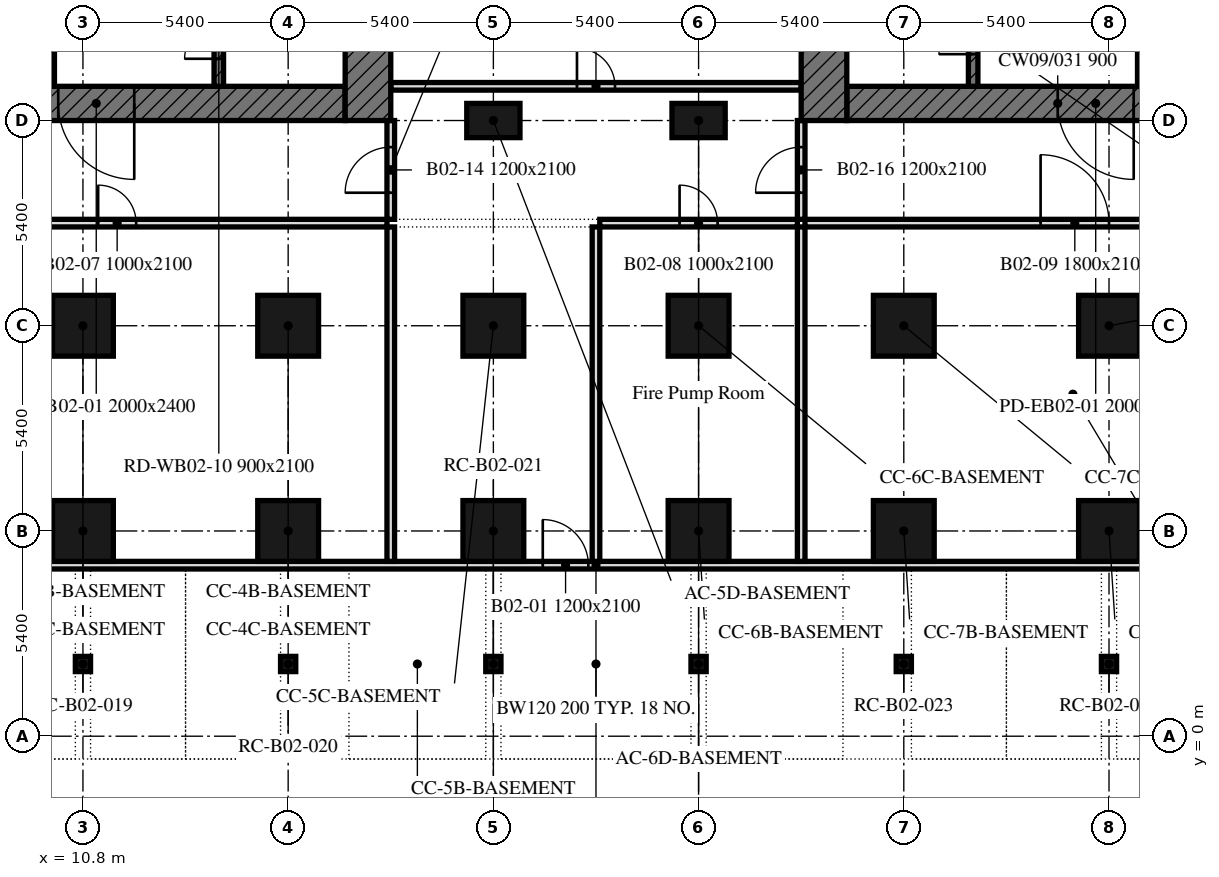
"""IFC4 building model, lengths in metres.
Left out: names, types, materials, properties, quantities, classifications, styles, units other than length and angle.
Written with IfcOpenShell. Run it as: python <this file> out.ifc"""

import sys

from ifc_helpers import new_model, si_unit, direction, frame, frame_2d, origin, origin_2d, place, context, subcontext, project, spatial, rectangle, extrude, element, fill, save


model = new_model("IFC4")
c1 = context("Model", 3, precision=1e-05, world=origin(), true_north=direction((0.0, 1.0)))
c2 = subcontext(c1, "Body", "Model", "MODEL_VIEW")
j1 = project(units=[si_unit("LENGTHUNIT", "METRE"), si_unit("PLANEANGLEUNIT", "RADIAN")], contexts=[c1])
p1 = place(None, origin())
s1 = spatial("IfcSite", under=j1, at=p1, CompositionType="ELEMENT")
p2 = place(p1, origin())
s2 = spatial("IfcBuilding", under=s1, at=p2, CompositionType="ELEMENT")
p3 = place(p2, frame((0.0, 0.0, -9.0)))
s3 = spatial("IfcBuildingStorey", under=s2, at=p3, CompositionType="ELEMENT", Elevation=-9.0)
for number, where, z_axis, x_axis in (
    (1, (10.8, 5.4, 0.0), (0.0, 0.0, 1.0), (1.0, 0.0, 0.0)),
    (2, (16.2, 5.4, 0.0), (0.0, 0.0, 1.0), (1.0, 0.0, 0.0)),
    (3, (21.6, 5.4, 0.0), (0.0, 0.0, 1.0), (1.0, 0.0, 0.0)),
    (4, (27.0, 5.4, 0.0), (0.0, 0.0, 1.0), (1.0, 0.0, 0.0)),
    (5, (32.4, 5.4, 0.0), (0.0, 0.0, 1.0), (1.0, 0.0, 0.0)),
    (6, (37.8, 5.4, 0.0), (0.0, 0.0, 1.0), (1.0, 0.0, 0.0)),
    (7, (10.8, 10.8, 0.0), (0.0, 0.0, 1.0), (1.0, 0.0, 0.0)),
    (8, (16.2, 10.8, 0.0), (0.0, 0.0, 1.0), (1.0, 0.0, 0.0)),
    (9, (21.6, 10.8, 0.0), (0.0, 0.0, 1.0), (1.0, 0.0, 0.0)),
    (10, (27.0, 10.8, 0.0), (0.0, 0.0, 1.0), (1.0, 0.0, 0.0)),
    (11, (32.4, 10.8, 0.0), (0.0, 0.0, 1.0), (1.0, 0.0, 0.0)),
    (12, (37.8, 10.8, 0.0), (0.0, 0.0, 1.0), (1.0, 0.0, 0.0)),
):
    element("IfcColumn", number, at=place(p3, frame(where, z_axis=z_axis, x_axis=x_axis)), inside=s3, PredefinedType="COLUMN", context=c2, shape_type="SweptSolid", body=[
        extrude(rectangle(XDim=1.6, YDim=1.6, at=origin_2d()), origin(), (0.0, 0.0, 1.0), 4.1),
    ])
for number, where, z_axis, x_axis in (
    (13, (21.6, 16.2, 0.0), (0.0, 0.0, 1.0), (1.0, 0.0, 0.0)),
    (14, (27.0, 16.2, 0.0), (0.0, 0.0, 1.0), (1.0, 0.0, 0.0)),
):
    element("IfcColumn", number, at=place(p3, frame(where, z_axis=z_axis, x_axis=x_axis)), inside=s3, PredefinedType="COLUMN", context=c2, shape_type="SweptSolid", body=[
        extrude(rectangle(XDim=1.4, YDim=0.9, at=origin_2d()), origin(), (0.0, 0.0, 1.0), 4.1),
    ])
for number, where, z_axis, x_axis in (
    (15, (10.8, 1.9, 0.0), (0.0, 0.0, 1.0), (1.0, 0.0, 0.0)),
    (16, (16.2, 1.9, 0.0), (0.0, 0.0, 1.0), (1.0, 0.0, 0.0)),
    (17, (21.6, 1.9, 0.0), (0.0, 0.0, 1.0), (1.0, 0.0, 0.0)),
    (18, (27.0, 1.9, 0.0), (0.0, 0.0, 1.0), (1.0, 0.0, 0.0)),
    (19, (32.4, 1.9, 0.0), (0.0, 0.0, 1.0), (1.0, 0.0, 0.0)),
    (20, (37.8, 1.9, 0.0), (0.0, 0.0, 1.0), (1.0, 0.0, 0.0)),
):
    element("IfcColumn", number, at=place(p3, frame(where, z_axis=z_axis, x_axis=x_axis)), inside=s3, PredefinedType="COLUMN", context=c2, shape_type="SweptSolid", body=[
        extrude(rectangle(XDim=0.4, YDim=0.4, at=origin_2d()), origin(), (0.0, 0.0, 1.0), 4.1),
    ])
p4 = place(p3, frame((4.6, 4.5, 0.0), z_axis=(0.0, 0.0, 1.0), x_axis=(1.0, 0.0, 0.0)))
e21 = element("IfcWall", 21, at=p4, inside=s3, PredefinedType="PARTITIONING", context=c2, shape_type="SweptSolid", body=[
    extrude(rectangle(XDim=39.4, YDim=0.2, at=frame_2d((19.7, 0.0))), origin(), (0.0, 0.0, 1.0), 4.1),
])
p5 = place(p4, frame((18.3, 0.0, 0.0)))
e22 = element("IfcOpeningElement", 22, at=p5, cuts=e21, PredefinedType="OPENING", context=c2, shape_type="SweptSolid", body=[
    extrude(rectangle(XDim=1.2, YDim=2.1, at=frame_2d((0.6, 1.05))), frame((0.0, 0.11, 0.0), z_axis=(0.0, -1.0, 0.0), x_axis=(1.0, 0.0, 0.0)), (0.0, 0.0, 1.0), 0.22),
])
for number, where, z_axis, x_axis in (
    (23, (18.9, 4.6, 0.0), (0.0, 0.0, 1.0), (0.0, 1.0, 0.0)),
    (24, (24.3, 4.6, 0.0), (0.0, 0.0, 1.0), (0.0, 1.0, 0.0)),
    (25, (29.7, 4.6, 0.0), (0.0, 0.0, 1.0), (0.0, 1.0, 0.0)),
):
    element("IfcWall", number, at=place(p3, frame(where, z_axis=z_axis, x_axis=x_axis)), inside=s3, PredefinedType="PARTITIONING", context=c2, shape_type="SweptSolid", body=[
        extrude(rectangle(XDim=8.8, YDim=0.2, at=frame_2d((4.4, 0.0))), origin(), (0.0, 0.0, 1.0), 4.1),
    ])
p6 = place(p3, frame((4.6, 13.5, 0.0), z_axis=(0.0, 0.0, 1.0), x_axis=(1.0, 0.0, 0.0)))
e26 = element("IfcWall", 26, at=p6, inside=s3, PredefinedType="PARTITIONING", context=c2, shape_type="SweptSolid", body=[
    extrude(rectangle(XDim=14.2, YDim=0.2, at=frame_2d((7.1, 0.0))), origin(), (0.0, 0.0, 1.0), 4.1),
])
p7 = place(p6, frame((6.6, 0.0, 0.0)))
e27 = element("IfcOpeningElement", 27, at=p7, cuts=e26, PredefinedType="OPENING", context=c2, shape_type="SweptSolid", body=[
    extrude(rectangle(XDim=1.0, YDim=2.1, at=frame_2d((0.5, 1.05))), frame((0.0, 0.11, 0.0), z_axis=(0.0, -1.0, 0.0), x_axis=(1.0, 0.0, 0.0)), (0.0, 0.0, 1.0), 0.22),
])
p8 = place(p3, frame((24.4, 13.5, 0.0), z_axis=(0.0, 0.0, 1.0), x_axis=(1.0, 0.0, 0.0)))
e28 = element("IfcWall", 28, at=p8, inside=s3, PredefinedType="PARTITIONING", context=c2, shape_type="SweptSolid", body=[
    extrude(rectangle(XDim=5.2, YDim=0.2, at=frame_2d((2.6, 0.0))), origin(), (0.0, 0.0, 1.0), 4.1),
])
p9 = place(p8, frame((2.1, 0.0, 0.0)))
e29 = element("IfcOpeningElement", 29, at=p9, cuts=e28, PredefinedType="OPENING", context=c2, shape_type="SweptSolid", body=[
    extrude(rectangle(XDim=1.0, YDim=2.1, at=frame_2d((0.5, 1.05))), frame((0.0, 0.11, 0.0), z_axis=(0.0, -1.0, 0.0), x_axis=(1.0, 0.0, 0.0)), (0.0, 0.0, 1.0), 0.22),
])
p10 = place(p3, frame((29.8, 13.5, 0.0), z_axis=(0.0, 0.0, 1.0), x_axis=(1.0, 0.0, 0.0)))
e30 = element("IfcWall", 30, at=p10, inside=s3, PredefinedType="PARTITIONING", context=c2, shape_type="SweptSolid", body=[
    extrude(rectangle(XDim=14.2, YDim=0.2, at=frame_2d((7.1, 0.0))), origin(), (0.0, 0.0, 1.0), 4.1),
])
p11 = place(p10, frame((6.2, 0.0, 0.0)))
e31 = element("IfcOpeningElement", 31, at=p11, cuts=e30, PredefinedType="OPENING", context=c2, shape_type="SweptSolid", body=[
    extrude(rectangle(XDim=1.8, YDim=2.1, at=frame_2d((0.9, 1.05))), frame((0.0, 0.11, 0.0), z_axis=(0.0, -1.0, 0.0), x_axis=(1.0, 0.0, 0.0)), (0.0, 0.0, 1.0), 0.22),
])
p12 = place(p3, frame((18.9, 13.6, 0.0), z_axis=(0.0, 0.0, 1.0), x_axis=(0.0, 1.0, 0.0)))
e32 = element("IfcWall", 32, at=p12, inside=s3, PredefinedType="PARTITIONING", context=c2, shape_type="SweptSolid", body=[
    extrude(rectangle(XDim=2.6, YDim=0.2, at=frame_2d((1.3, 0.0))), origin(), (0.0, 0.0, 1.0), 4.1),
])
p13 = place(p12, frame((0.7, 0.0, 0.0)))
e33 = element("IfcOpeningElement", 33, at=p13, cuts=e32, PredefinedType="OPENING", context=c2, shape_type="SweptSolid", body=[
    extrude(rectangle(XDim=1.2, YDim=2.1, at=frame_2d((0.6, 1.05))), frame((0.0, 0.11, 0.0), z_axis=(0.0, -1.0, 0.0), x_axis=(1.0, 0.0, 0.0)), (0.0, 0.0, 1.0), 0.22),
])
p14 = place(p3, frame((29.7, 13.6, 0.0), z_axis=(0.0, 0.0, 1.0), x_axis=(0.0, 1.0, 0.0)))
e34 = element("IfcWall", 34, at=p14, inside=s3, PredefinedType="PARTITIONING", context=c2, shape_type="SweptSolid", body=[
    extrude(rectangle(XDim=2.6, YDim=0.2, at=frame_2d((1.3, 0.0))), origin(), (0.0, 0.0, 1.0), 4.1),
])
p15 = place(p14, frame((0.7, 0.0, 0.0)))
e35 = element("IfcOpeningElement", 35, at=p15, cuts=e34, PredefinedType="OPENING", context=c2, shape_type="SweptSolid", body=[
    extrude(rectangle(XDim=1.2, YDim=2.1, at=frame_2d((0.6, 1.05))), frame((0.0, 0.11, 0.0), z_axis=(0.0, -1.0, 0.0), x_axis=(1.0, 0.0, 0.0)), (0.0, 0.0, 1.0), 0.22),
])
p16 = place(p3, frame((18.9, 17.1, 0.0), z_axis=(0.0, 0.0, 1.0), x_axis=(1.0, 0.0, 0.0)))
e36 = element("IfcWall", 36, at=p16, inside=s3, PredefinedType="PARTITIONING", context=c2, shape_type="SweptSolid", body=[
    extrude(rectangle(XDim=10.8, YDim=0.2, at=frame_2d((5.4, 0.0))), origin(), (0.0, 0.0, 1.0), 4.1),
])
p17 = place(p16, frame((4.9, 0.0, 0.0)))
e37 = element("IfcOpeningElement", 37, at=p17, cuts=e36, PredefinedType="OPENING", context=c2, shape_type="SweptSolid", body=[
    extrude(rectangle(XDim=1.0, YDim=2.1, at=frame_2d((0.5, 1.05))), frame((0.0, 0.11, 0.0), z_axis=(0.0, -1.0, 0.0), x_axis=(1.0, 0.0, 0.0)), (0.0, 0.0, 1.0), 0.22),
])
p18 = place(p3, frame((17.7, 16.65, 0.0), z_axis=(0.0, 0.0, 1.0), x_axis=(-1.0, 0.0, 0.0)))
e38 = element("IfcWall", 38, at=p18, inside=s3, PredefinedType="SOLIDWALL", context=c2, shape_type="SweptSolid", body=[
    extrude(rectangle(XDim=11.1, YDim=0.9, at=frame_2d((5.55, 0.0))), origin(), (0.0, 0.0, 1.0), 4.1),
])
p19 = place(p18, frame((5.55, 0.0, 0.0)))
e39 = element("IfcOpeningElement", 39, at=p19, cuts=e38, PredefinedType="OPENING", context=c2, shape_type="SweptSolid", body=[
    extrude(rectangle(XDim=2.0, YDim=2.4, at=frame_2d((1.0, 1.2))), frame((0.0, 0.45, 0.0), z_axis=(0.0, -1.0, 0.0), x_axis=(1.0, 0.0, 0.0)), (0.0, 0.0, 1.0), 0.9),
])
p20 = place(p3, frame((18.3, 32.4, 0.0), z_axis=(0.0, 0.0, 1.0), x_axis=(0.0, -1.0, 0.0)))
e40 = element("IfcWall", 40, at=p20, inside=s3, PredefinedType="SOLIDWALL", context=c2, shape_type="SweptSolid", body=[
    extrude(rectangle(XDim=16.2, YDim=1.2, at=frame_2d((8.1, 0.0))), origin(), (0.0, 0.0, 1.0), 4.1),
])
p21 = place(p3, frame((9.925, 17.1, 0.0), z_axis=(0.0, 0.0, 1.0), x_axis=(0.0, 1.0, 0.0)))
e41 = element("IfcWall", 41, at=p21, inside=s3, PredefinedType="SOLIDWALL", context=c2, shape_type="SweptSolid", body=[
    extrude(rectangle(XDim=14.4, YDim=0.25, at=frame_2d((7.2, 0.0))), origin(), (0.0, 0.0, 1.0), 4.1),
])
p22 = place(p21, frame((4.6, 0.0, 0.0)))
e42 = element("IfcOpeningElement", 42, at=p22, cuts=e41, PredefinedType="OPENING", context=c2, shape_type="SweptSolid", body=[
    extrude(rectangle(XDim=1.0, YDim=2.1, at=frame_2d((0.5, 1.05))), frame((0.0, 0.125, 0.0), z_axis=(0.0, -1.0, 0.0), x_axis=(1.0, 0.0, 0.0)), (0.0, 0.0, 1.0), 0.25),
])
p23 = place(p21, frame((7.062, 0.0, 0.0)))
e43 = element("IfcOpeningElement", 43, at=p23, cuts=e41, PredefinedType="OPENING", context=c2, shape_type="SweptSolid", body=[
    extrude(rectangle(XDim=1.2, YDim=2.1, at=frame_2d((0.6, 1.05))), frame((0.0, 0.125, 0.0), z_axis=(0.0, -1.0, 0.0), x_axis=(1.0, 0.0, 0.0)), (0.0, 0.0, 1.0), 0.25),
])
p24 = place(p21, frame((9.925, 0.0, 0.0)))
e44 = element("IfcOpeningElement", 44, at=p24, cuts=e41, PredefinedType="OPENING", context=c2, shape_type="SweptSolid", body=[
    extrude(rectangle(XDim=1.1, YDim=2.1, at=frame_2d((0.55, 1.05))), frame((0.0, 0.125, 0.0), z_axis=(0.0, -1.0, 0.0), x_axis=(1.0, 0.0, 0.0)), (0.0, 0.0, 1.0), 0.25),
])
p25 = place(p21, frame((12.587, 0.0, 0.0)))
e45 = element("IfcOpeningElement", 45, at=p25, cuts=e41, PredefinedType="OPENING", context=c2, shape_type="SweptSolid", body=[
    extrude(rectangle(XDim=1.1, YDim=2.1, at=frame_2d((0.55, 1.05))), frame((0.0, 0.125, 0.0), z_axis=(0.0, -1.0, 0.0), x_axis=(1.0, 0.0, 0.0)), (0.0, 0.0, 1.0), 0.25),
])
p26 = place(p3, frame((14.375, 17.1, 0.0), z_axis=(0.0, 0.0, 1.0), x_axis=(0.0, 1.0, 0.0)))
e46 = element("IfcWall", 46, at=p26, inside=s3, PredefinedType="SOLIDWALL", context=c2, shape_type="SweptSolid", body=[
    extrude(rectangle(XDim=14.4, YDim=0.25, at=frame_2d((7.2, 0.0))), origin(), (0.0, 0.0, 1.0), 4.1),
])
p27 = place(p26, frame((13.15, 0.0, 0.0)))
e47 = element("IfcOpeningElement", 47, at=p27, cuts=e46, PredefinedType="OPENING", context=c2, shape_type="SweptSolid", body=[
    extrude(rectangle(XDim=1.0, YDim=2.1, at=frame_2d((0.5, 1.05))), frame((0.0, 0.125, 0.0), z_axis=(0.0, -1.0, 0.0), x_axis=(1.0, 0.0, 0.0)), (0.0, 0.0, 1.0), 0.25),
])
p28 = place(p26, frame((0.725, 0.0, 0.0)))
e48 = element("IfcOpeningElement", 48, at=p28, cuts=e46, PredefinedType="OPENING", context=c2, shape_type="SweptSolid", body=[
    extrude(rectangle(XDim=0.9, YDim=2.1, at=frame_2d((0.45, 1.05))), frame((0.0, 0.125, 0.0), z_axis=(0.0, -1.0, 0.0), x_axis=(1.0, 0.0, 0.0)), (0.0, 0.0, 1.0), 0.25),
])
p29 = place(p26, frame((3.225, 0.0, 0.0)))
e49 = element("IfcOpeningElement", 49, at=p29, cuts=e46, PredefinedType="OPENING", context=c2, shape_type="SweptSolid", body=[
    extrude(rectangle(XDim=0.9, YDim=2.1, at=frame_2d((0.45, 1.05))), frame((0.0, 0.125, 0.0), z_axis=(0.0, -1.0, 0.0), x_axis=(1.0, 0.0, 0.0)), (0.0, 0.0, 1.0), 0.25),
])
p30 = place(p26, frame((6.175, 0.0, 0.0)))
e50 = element("IfcOpeningElement", 50, at=p30, cuts=e46, PredefinedType="OPENING", context=c2, shape_type="SweptSolid", body=[
    extrude(rectangle(XDim=0.9, YDim=2.1, at=frame_2d((0.45, 1.05))), frame((0.0, 0.125, 0.0), z_axis=(0.0, -1.0, 0.0), x_axis=(1.0, 0.0, 0.0)), (0.0, 0.0, 1.0), 0.25),
])
p31 = place(p3, frame((42.0, 16.65, 0.0), z_axis=(0.0, 0.0, 1.0), x_axis=(-1.0, 0.0, 0.0)))
e51 = element("IfcWall", 51, at=p31, inside=s3, PredefinedType="SOLIDWALL", context=c2, shape_type="SweptSolid", body=[
    extrude(rectangle(XDim=11.1, YDim=0.9, at=frame_2d((5.55, 0.0))), origin(), (0.0, 0.0, 1.0), 4.1),
])
p32 = place(p31, frame((3.55, 0.0, 0.0)))
e52 = element("IfcOpeningElement", 52, at=p32, cuts=e51, PredefinedType="OPENING", context=c2, shape_type="SweptSolid", body=[
    extrude(rectangle(XDim=2.0, YDim=2.4, at=frame_2d((1.0, 1.2))), frame((0.0, 0.45, 0.0), z_axis=(0.0, -1.0, 0.0), x_axis=(1.0, 0.0, 0.0)), (0.0, 0.0, 1.0), 0.9),
])
p33 = place(p3, frame((30.3, 16.2, 0.0), z_axis=(0.0, 0.0, 1.0), x_axis=(0.0, 1.0, 0.0)))
e53 = element("IfcWall", 53, at=p33, inside=s3, PredefinedType="SOLIDWALL", context=c2, shape_type="SweptSolid", body=[
    extrude(rectangle(XDim=16.2, YDim=1.2, at=frame_2d((8.1, 0.0))), origin(), (0.0, 0.0, 1.0), 4.1),
])
p34 = place(p3, frame((38.675, 17.1, 0.0), z_axis=(0.0, 0.0, 1.0), x_axis=(0.0, 1.0, 0.0)))
e54 = element("IfcWall", 54, at=p34, inside=s3, PredefinedType="SOLIDWALL", context=c2, shape_type="SweptSolid", body=[
    extrude(rectangle(XDim=14.4, YDim=0.25, at=frame_2d((7.2, 0.0))), origin(), (0.0, 0.0, 1.0), 4.1),
])
p35 = place(p34, frame((4.6, 0.0, 0.0)))
e55 = element("IfcOpeningElement", 55, at=p35, cuts=e54, PredefinedType="OPENING", context=c2, shape_type="SweptSolid", body=[
    extrude(rectangle(XDim=1.0, YDim=2.1, at=frame_2d((0.5, 1.05))), frame((0.0, 0.125, 0.0), z_axis=(0.0, -1.0, 0.0), x_axis=(1.0, 0.0, 0.0)), (0.0, 0.0, 1.0), 0.25),
])
p36 = place(p34, frame((7.062, 0.0, 0.0)))
e56 = element("IfcOpeningElement", 56, at=p36, cuts=e54, PredefinedType="OPENING", context=c2, shape_type="SweptSolid", body=[
    extrude(rectangle(XDim=1.2, YDim=2.1, at=frame_2d((0.6, 1.05))), frame((0.0, 0.125, 0.0), z_axis=(0.0, -1.0, 0.0), x_axis=(1.0, 0.0, 0.0)), (0.0, 0.0, 1.0), 0.25),
])
p37 = place(p34, frame((9.925, 0.0, 0.0)))
e57 = element("IfcOpeningElement", 57, at=p37, cuts=e54, PredefinedType="OPENING", context=c2, shape_type="SweptSolid", body=[
    extrude(rectangle(XDim=1.1, YDim=2.1, at=frame_2d((0.55, 1.05))), frame((0.0, 0.125, 0.0), z_axis=(0.0, -1.0, 0.0), x_axis=(1.0, 0.0, 0.0)), (0.0, 0.0, 1.0), 0.25),
])
p38 = place(p34, frame((12.587, 0.0, 0.0)))
e58 = element("IfcOpeningElement", 58, at=p38, cuts=e54, PredefinedType="OPENING", context=c2, shape_type="SweptSolid", body=[
    extrude(rectangle(XDim=1.1, YDim=2.1, at=frame_2d((0.55, 1.05))), frame((0.0, 0.125, 0.0), z_axis=(0.0, -1.0, 0.0), x_axis=(1.0, 0.0, 0.0)), (0.0, 0.0, 1.0), 0.25),
])
p39 = place(p3, frame((34.225, 17.1, 0.0), z_axis=(0.0, 0.0, 1.0), x_axis=(0.0, 1.0, 0.0)))
e59 = element("IfcWall", 59, at=p39, inside=s3, PredefinedType="SOLIDWALL", context=c2, shape_type="SweptSolid", body=[
    extrude(rectangle(XDim=14.4, YDim=0.25, at=frame_2d((7.2, 0.0))), origin(), (0.0, 0.0, 1.0), 4.1),
])
p40 = place(p39, frame((13.15, 0.0, 0.0)))
e60 = element("IfcOpeningElement", 60, at=p40, cuts=e59, PredefinedType="OPENING", context=c2, shape_type="SweptSolid", body=[
    extrude(rectangle(XDim=1.0, YDim=2.1, at=frame_2d((0.5, 1.05))), frame((0.0, 0.125, 0.0), z_axis=(0.0, -1.0, 0.0), x_axis=(1.0, 0.0, 0.0)), (0.0, 0.0, 1.0), 0.25),
])
p41 = place(p39, frame((0.846, 0.0, 0.0)))
e61 = element("IfcOpeningElement", 61, at=p41, cuts=e59, PredefinedType="OPENING", context=c2, shape_type="SweptSolid", body=[
    extrude(rectangle(XDim=0.9, YDim=2.1, at=frame_2d((0.45, 1.05))), frame((0.0, 0.125, 0.0), z_axis=(0.0, -1.0, 0.0), x_axis=(1.0, 0.0, 0.0)), (0.0, 0.0, 1.0), 0.25),
])
p42 = place(p39, frame((3.346, 0.0, 0.0)))
e62 = element("IfcOpeningElement", 62, at=p42, cuts=e59, PredefinedType="OPENING", context=c2, shape_type="SweptSolid", body=[
    extrude(rectangle(XDim=0.9, YDim=2.1, at=frame_2d((0.45, 1.05))), frame((0.0, 0.125, 0.0), z_axis=(0.0, -1.0, 0.0), x_axis=(1.0, 0.0, 0.0)), (0.0, 0.0, 1.0), 0.25),
])
p43 = place(p39, frame((6.175, 0.0, 0.0)))
e63 = element("IfcOpeningElement", 63, at=p43, cuts=e59, PredefinedType="OPENING", context=c2, shape_type="SweptSolid", body=[
    extrude(rectangle(XDim=0.9, YDim=2.1, at=frame_2d((0.45, 1.05))), frame((0.0, 0.125, 0.0), z_axis=(0.0, -1.0, 0.0), x_axis=(1.0, 0.0, 0.0)), (0.0, 0.0, 1.0), 0.25),
])
p44 = place(p5, origin())
e64 = element("IfcDoor", 64, at=p44, inside=s3, OperationType="SINGLE_SWING_LEFT", PredefinedType="DOOR", context=c2, shape_type="SweptSolid", body=[
    extrude(rectangle(XDim=1.2, YDim=2.1, at=frame_2d((0.6, 1.05))), frame((0.0, 0.025, 0.0), z_axis=(0.0, -1.0, 0.0), x_axis=(1.0, 0.0, 0.0)), (0.0, 0.0, 1.0), 0.05),
])
fill(e22, e64)
p45 = place(p7, origin())
e65 = element("IfcDoor", 65, at=p45, inside=s3, OperationType="SINGLE_SWING_LEFT", PredefinedType="DOOR", context=c2, shape_type="SweptSolid", body=[
    extrude(rectangle(XDim=1.0, YDim=2.1, at=frame_2d((0.5, 1.05))), frame((0.0, 0.025, 0.0), z_axis=(0.0, -1.0, 0.0), x_axis=(1.0, 0.0, 0.0)), (0.0, 0.0, 1.0), 0.05),
])
fill(e27, e65)
p46 = place(p9, origin())
e66 = element("IfcDoor", 66, at=p46, inside=s3, OperationType="SINGLE_SWING_LEFT", PredefinedType="DOOR", context=c2, shape_type="SweptSolid", body=[
    extrude(rectangle(XDim=1.0, YDim=2.1, at=frame_2d((0.5, 1.05))), frame((0.0, 0.025, 0.0), z_axis=(0.0, -1.0, 0.0), x_axis=(1.0, 0.0, 0.0)), (0.0, 0.0, 1.0), 0.05),
])
fill(e29, e66)
p47 = place(p11, origin())
e67 = element("IfcDoor", 67, at=p47, inside=s3, OperationType="DOUBLE_DOOR_SINGLE_SWING", PredefinedType="DOOR", context=c2, shape_type="SweptSolid", body=[
    extrude(rectangle(XDim=1.8, YDim=2.1, at=frame_2d((0.9, 1.05))), frame((0.0, 0.025, 0.0), z_axis=(0.0, -1.0, 0.0), x_axis=(1.0, 0.0, 0.0)), (0.0, 0.0, 1.0), 0.05),
])
fill(e31, e67)
p48 = place(p13, origin())
e68 = element("IfcDoor", 68, at=p48, inside=s3, OperationType="SINGLE_SWING_LEFT", PredefinedType="DOOR", context=c2, shape_type="SweptSolid", body=[
    extrude(rectangle(XDim=1.2, YDim=2.1, at=frame_2d((0.6, 1.05))), frame((0.0, 0.025, 0.0), z_axis=(0.0, -1.0, 0.0), x_axis=(1.0, 0.0, 0.0)), (0.0, 0.0, 1.0), 0.05),
])
fill(e33, e68)
p49 = place(p15, origin())
e69 = element("IfcDoor", 69, at=p49, inside=s3, OperationType="SINGLE_SWING_LEFT", PredefinedType="DOOR", context=c2, shape_type="SweptSolid", body=[
    extrude(rectangle(XDim=1.2, YDim=2.1, at=frame_2d((0.6, 1.05))), frame((0.0, 0.025, 0.0), z_axis=(0.0, -1.0, 0.0), x_axis=(1.0, 0.0, 0.0)), (0.0, 0.0, 1.0), 0.05),
])
fill(e35, e69)
p50 = place(p17, origin())
e70 = element("IfcDoor", 70, at=p50, inside=s3, OperationType="SINGLE_SWING_LEFT", PredefinedType="DOOR", context=c2, shape_type="SweptSolid", body=[
    extrude(rectangle(XDim=1.0, YDim=2.1, at=frame_2d((0.5, 1.05))), frame((0.0, 0.025, 0.0), z_axis=(0.0, -1.0, 0.0), x_axis=(1.0, 0.0, 0.0)), (0.0, 0.0, 1.0), 0.05),
])
fill(e37, e70)
p51 = place(p19, origin())
e71 = element("IfcDoor", 71, at=p51, inside=s3, OperationType="DOUBLE_DOOR_SINGLE_SWING", PredefinedType="DOOR", context=c2, shape_type="SweptSolid", body=[
    extrude(rectangle(XDim=2.0, YDim=2.4, at=frame_2d((1.0, 1.2))), frame((0.0, 0.025, 0.0), z_axis=(0.0, -1.0, 0.0), x_axis=(1.0, 0.0, 0.0)), (0.0, 0.0, 1.0), 0.05),
])
fill(e39, e71)
p52 = place(p28, origin())
e72 = element("IfcDoor", 72, at=p52, inside=s3, OperationType="SINGLE_SWING_LEFT", PredefinedType="DOOR", context=c2, shape_type="SweptSolid", body=[
    extrude(rectangle(XDim=0.9, YDim=2.1, at=frame_2d((0.45, 1.05))), frame((0.0, 0.025, 0.0), z_axis=(0.0, -1.0, 0.0), x_axis=(1.0, 0.0, 0.0)), (0.0, 0.0, 1.0), 0.05),
])
fill(e48, e72)
p53 = place(p32, origin())
e73 = element("IfcDoor", 73, at=p53, inside=s3, OperationType="DOUBLE_DOOR_SINGLE_SWING", PredefinedType="DOOR", context=c2, shape_type="SweptSolid", body=[
    extrude(rectangle(XDim=2.0, YDim=2.4, at=frame_2d((1.0, 1.2))), frame((0.0, 0.025, 0.0), z_axis=(0.0, -1.0, 0.0), x_axis=(1.0, 0.0, 0.0)), (0.0, 0.0, 1.0), 0.05),
])
fill(e52, e73)
p54 = place(p41, origin())
e74 = element("IfcDoor", 74, at=p54, inside=s3, OperationType="SINGLE_SWING_LEFT", PredefinedType="DOOR", context=c2, shape_type="SweptSolid", body=[
    extrude(rectangle(XDim=0.9, YDim=2.1, at=frame_2d((0.45, 1.05))), frame((0.0, 0.025, 0.0), z_axis=(0.0, -1.0, 0.0), x_axis=(1.0, 0.0, 0.0)), (0.0, 0.0, 1.0), 0.05),
])
fill(e61, e74)
save(model, sys.argv[1])
